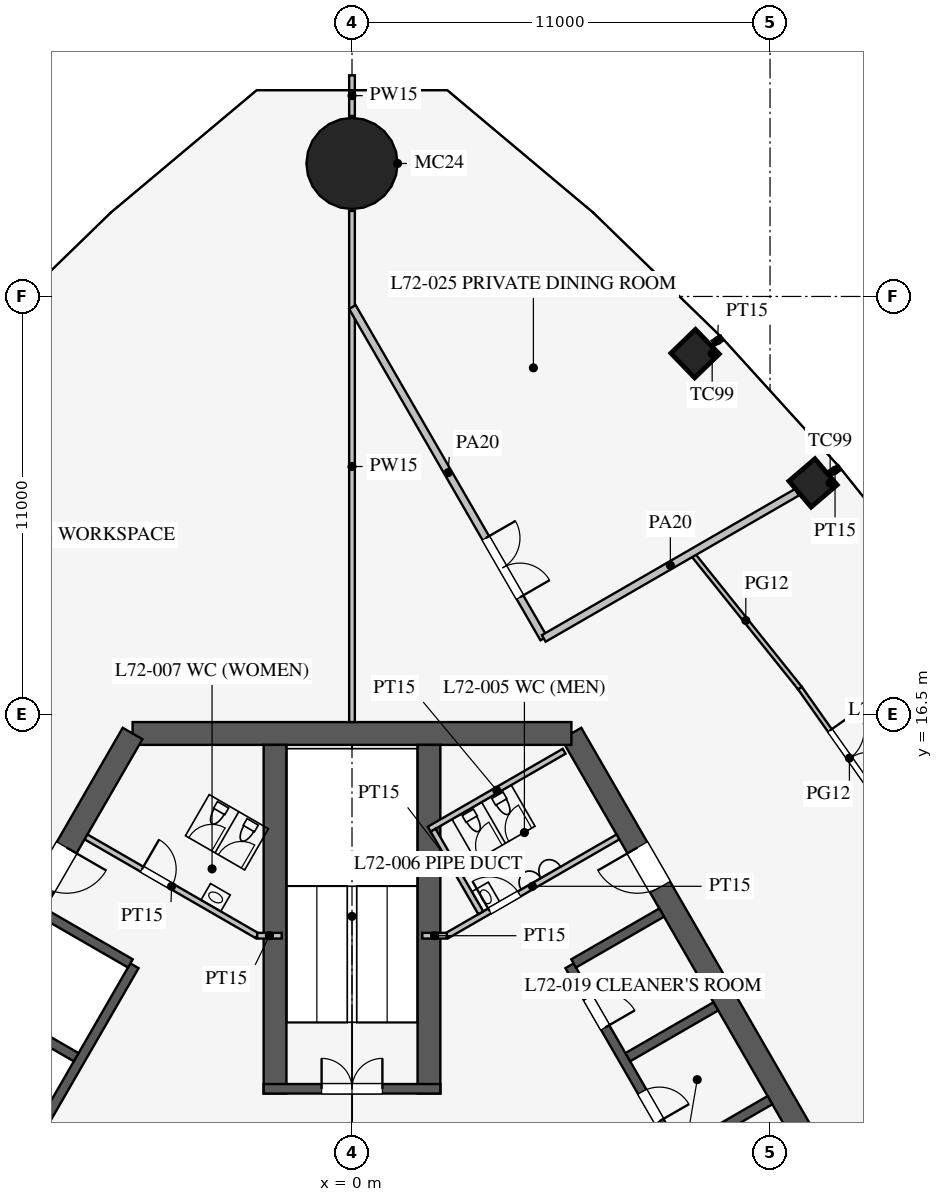
"""IFC4 building model, lengths in metres.
Left out: names, types, materials, properties, quantities, classifications, styles, units other than length and angle.
Written with IfcOpenShell. Run it as: python <this file> out.ifc"""

import sys

from ifc_helpers import new_model, si_unit, direction, frame, frame_2d, origin, origin_2d, place, context, subcontext, project, spatial, rectangle, circle, extrude, element, fill, save


model = new_model("IFC4")
c1 = context("Model", 3, precision=1e-05, world=origin(), true_north=direction((0.0, 1.0)))
c2 = subcontext(c1, "Body", "Model", "MODEL_VIEW")
j1 = project(units=[si_unit("LENGTHUNIT", "METRE"), si_unit("PLANEANGLEUNIT", "RADIAN")], contexts=[c1])
p1 = place(None, origin())
s1 = spatial("IfcSite", under=j1, at=p1, CompositionType="ELEMENT")
p2 = place(p1, origin())
s2 = spatial("IfcBuilding", under=s1, at=p2, CompositionType="ELEMENT")
p3 = place(p2, frame((0.0, 0.0, 314.1)))
s3 = spatial("IfcBuildingStorey", under=s2, at=p3, CompositionType="ELEMENT", Elevation=314.1)
for number, where, z_axis, x_axis in (
    (1, (12.132, 22.593, 0.0), (0.0, 0.0, 1.0), (-0.649, 0.761, 0.0)),
    (2, (9.027, 25.997, 0.0), (0.0, 0.0, 1.0), (-0.695, 0.719, 0.0)),
):
    element("IfcColumn", number, at=place(p3, frame(where, z_axis=z_axis, x_axis=x_axis)), inside=s3, PredefinedType="COLUMN", context=c2, shape_type="SweptSolid", body=[
        extrude(rectangle(XDim=0.9, YDim=0.9, at=origin_2d()), origin(), (0.0, 0.0, 1.0), 4.2),
    ])
p4 = place(p3, frame((0.0, 31.0, 0.0), z_axis=(0.0, 0.0, 1.0), x_axis=(1.0, 0.0, 0.0)))
e3 = element("IfcColumn", 3, at=p4, inside=s3, PredefinedType="COLUMN", context=c2, shape_type="SweptSolid", body=[
    extrude(circle(Radius=1.2, at=origin_2d()), origin(), (0.0, 0.0, 1.0), 4.2),
])
p5 = place(p3, frame((16.743, -3.0, 0.0), z_axis=(0.0, 0.0, 1.0), x_axis=(-0.500002442456, 0.866023993627, 0.0)))
e4 = element("IfcWall", 4, at=p5, inside=s3, PredefinedType="SHEAR", context=c2, shape_type="SweptSolid", body=[
    extrude(rectangle(XDim=21.939, YDim=0.6, at=frame_2d((10.97, 0.0))), origin(), (0.0, 0.0, 1.0), 4.2),
])
p6 = place(p5, frame((17.27, 0.0, 0.0)))
e5 = element("IfcOpeningElement", 5, at=p6, cuts=e4, PredefinedType="OPENING", context=c2, shape_type="SweptSolid", body=[
    extrude(rectangle(XDim=1.2, YDim=2.1, at=frame_2d((0.6, 1.05))), frame((0.0, 0.31, 0.0), z_axis=(0.0, -1.0, 0.0), x_axis=(1.0, 0.0, 0.0)), (0.0, 0.0, 1.0), 0.62),
])
p7 = place(p5, frame((3.47, 0.0, 0.0)))
e6 = element("IfcOpeningElement", 6, at=p7, cuts=e4, PredefinedType="OPENING", context=c2, shape_type="SweptSolid", body=[
    extrude(rectangle(XDim=1.2, YDim=2.1, at=frame_2d((0.6, 1.05))), frame((0.0, 0.31, 0.0), z_axis=(0.0, -1.0, 0.0), x_axis=(1.0, 0.0, 0.0)), (0.0, 0.0, 1.0), 0.62),
])
p8 = place(p3, frame((5.773, 16.0, 0.0), z_axis=(0.0, 0.0, 1.0), x_axis=(-1.0, 0.0, 0.0)))
e7 = element("IfcWall", 7, at=p8, inside=s3, PredefinedType="SHEAR", context=c2, shape_type="SweptSolid", body=[
    extrude(rectangle(XDim=11.547, YDim=0.6, at=frame_2d((5.773, 0.0))), origin(), (0.0, 0.0, 1.0), 4.2),
])
p9 = place(p3, frame((-5.773, 16.0, 0.0), z_axis=(0.0, 0.0, 1.0), x_axis=(-0.500002442456, -0.866023993627, 0.0)))
e8 = element("IfcWall", 8, at=p9, inside=s3, PredefinedType="SHEAR", context=c2, shape_type="SweptSolid", body=[
    extrude(rectangle(XDim=21.939, YDim=0.6, at=frame_2d((10.97, 0.0))), origin(), (0.0, 0.0, 1.0), 4.2),
])
p10 = place(p9, frame((17.27, 0.0, 0.0)))
e9 = element("IfcOpeningElement", 9, at=p10, cuts=e8, PredefinedType="OPENING", context=c2, shape_type="SweptSolid", body=[
    extrude(rectangle(XDim=1.2, YDim=2.1, at=frame_2d((0.6, 1.05))), frame((0.0, 0.31, 0.0), z_axis=(0.0, -1.0, 0.0), x_axis=(1.0, 0.0, 0.0)), (0.0, 0.0, 1.0), 0.62),
])
p11 = place(p9, frame((3.47, 0.0, 0.0)))
e10 = element("IfcOpeningElement", 10, at=p11, cuts=e8, PredefinedType="OPENING", context=c2, shape_type="SweptSolid", body=[
    extrude(rectangle(XDim=1.2, YDim=2.1, at=frame_2d((0.6, 1.05))), frame((0.0, 0.31, 0.0), z_axis=(0.0, -1.0, 0.0), x_axis=(1.0, 0.0, 0.0)), (0.0, 0.0, 1.0), 0.62),
])
p12 = place(p3, frame((11.424, 0.014, 0.0), z_axis=(0.0, 0.0, 1.0), x_axis=(-0.500001763848, 0.866024385424, 0.0)))
e11 = element("IfcWall", 11, at=p12, inside=s3, PredefinedType="SHEAR", context=c2, shape_type="SweptSolid", body=[
    extrude(rectangle(XDim=11.4, YDim=0.25, at=frame_2d((5.7, 0.0))), origin(), (0.0, 0.0, 1.0), 4.2),
])
p13 = place(p12, frame((0.975, 0.0, 0.0)))
e12 = element("IfcOpeningElement", 12, at=p13, cuts=e11, PredefinedType="OPENING", context=c2, shape_type="SweptSolid", body=[
    extrude(rectangle(XDim=0.9, YDim=2.1, at=frame_2d((0.45, 1.05))), frame((0.0, 0.135, 0.0), z_axis=(0.0, -1.0, 0.0), x_axis=(1.0, 0.0, 0.0)), (0.0, 0.0, 1.0), 0.27),
])
p14 = place(p12, frame((3.825, 0.0, 0.0)))
e13 = element("IfcOpeningElement", 13, at=p14, cuts=e11, PredefinedType="OPENING", context=c2, shape_type="SweptSolid", body=[
    extrude(rectangle(XDim=0.9, YDim=2.1, at=frame_2d((0.45, 1.05))), frame((0.0, 0.135, 0.0), z_axis=(0.0, -1.0, 0.0), x_axis=(1.0, 0.0, 0.0)), (0.0, 0.0, 1.0), 0.27),
])
p15 = place(p12, frame((6.675, 0.0, 0.0)))
e14 = element("IfcOpeningElement", 14, at=p15, cuts=e11, PredefinedType="OPENING", context=c2, shape_type="SweptSolid", body=[
    extrude(rectangle(XDim=0.9, YDim=2.1, at=frame_2d((0.45, 1.05))), frame((0.0, 0.135, 0.0), z_axis=(0.0, -1.0, 0.0), x_axis=(1.0, 0.0, 0.0)), (0.0, 0.0, 1.0), 0.27),
])
p16 = place(p12, frame((9.525, 0.0, 0.0)))
e15 = element("IfcOpeningElement", 15, at=p16, cuts=e11, PredefinedType="OPENING", context=c2, shape_type="SweptSolid", body=[
    extrude(rectangle(XDim=0.9, YDim=2.1, at=frame_2d((0.45, 1.05))), frame((0.0, 0.135, 0.0), z_axis=(0.0, -1.0, 0.0), x_axis=(1.0, 0.0, 0.0)), (0.0, 0.0, 1.0), 0.27),
])
for number, where, z_axis, x_axis in (
    (16, (8.682, 5.012, 0.0), (0.0, 0.0, 1.0), (0.866, 0.5, 0.0)),
    (17, (7.257, 7.481, 0.0), (0.0, 0.0, 1.0), (0.866, 0.5, 0.0)),
    (18, (5.832, 9.949, 0.0), (0.0, 0.0, 1.0), (0.866, 0.5, 0.0)),
):
    element("IfcWall", number, at=place(p3, frame(where, z_axis=z_axis, x_axis=x_axis)), inside=s3, PredefinedType="SHEAR", context=c2, shape_type="SweptSolid", body=[
        extrude(rectangle(XDim=2.675, YDim=0.25, at=frame_2d((1.337, 0.0))), origin(), (0.0, 0.0, 1.0), 4.2),
    ])
p17 = place(p3, frame((-5.724, 9.886, 0.0), z_axis=(0.0, 0.0, 1.0), x_axis=(-0.500001763848, -0.866024385424, 0.0)))
e19 = element("IfcWall", 19, at=p17, inside=s3, PredefinedType="SHEAR", context=c2, shape_type="SweptSolid", body=[
    extrude(rectangle(XDim=11.4, YDim=0.25, at=frame_2d((5.7, 0.0))), origin(), (0.0, 0.0, 1.0), 4.2),
])
p18 = place(p17, frame((6.525, 0.0, 0.0)))
e20 = element("IfcOpeningElement", 20, at=p18, cuts=e19, PredefinedType="OPENING", context=c2, shape_type="SweptSolid", body=[
    extrude(rectangle(XDim=1.2, YDim=2.2, at=frame_2d((0.6, 1.1))), frame((0.0, 0.135, 0.0), z_axis=(0.0, -1.0, 0.0), x_axis=(1.0, 0.0, 0.0)), (0.0, 0.0, 1.0), 0.27),
])
p19 = place(p17, frame((9.375, 0.0, 0.0)))
e21 = element("IfcOpeningElement", 21, at=p19, cuts=e19, PredefinedType="OPENING", context=c2, shape_type="SweptSolid", body=[
    extrude(rectangle(XDim=1.2, YDim=2.2, at=frame_2d((0.6, 1.1))), frame((0.0, 0.135, 0.0), z_axis=(0.0, -1.0, 0.0), x_axis=(1.0, 0.0, 0.0)), (0.0, 0.0, 1.0), 0.27),
])
for number, where, z_axis, x_axis in (
    (22, (-5.832, 9.949, 0.0), (0.0, 0.0, 1.0), (-0.866, 0.5, 0.0)),
    (23, (-7.257, 7.481, 0.0), (0.0, 0.0, 1.0), (-0.866, 0.5, 0.0)),
):
    element("IfcWall", number, at=place(p3, frame(where, z_axis=z_axis, x_axis=x_axis)), inside=s3, PredefinedType="SHEAR", context=c2, shape_type="SweptSolid", body=[
        extrude(rectangle(XDim=2.675, YDim=0.25, at=frame_2d((1.337, 0.0))), origin(), (0.0, 0.0, 1.0), 4.2),
    ])
for number, where, z_axis, x_axis in (
    (24, (2.025, 6.525, 0.0), (0.0, 0.0, 1.0), (0.0, 1.0, 0.0)),
    (25, (-2.025, 6.525, 0.0), (0.0, 0.0, 1.0), (0.0, 1.0, 0.0)),
):
    element("IfcWall", number, at=place(p3, frame(where, z_axis=z_axis, x_axis=x_axis)), inside=s3, PredefinedType="SHEAR", context=c2, shape_type="SweptSolid", body=[
        extrude(rectangle(XDim=9.175, YDim=0.6, at=frame_2d((4.587, 0.0))), origin(), (0.0, 0.0, 1.0), 4.2),
    ])
p20 = place(p3, frame((2.325, 6.65, 0.0), z_axis=(0.0, 0.0, 1.0), x_axis=(-1.0, 0.0, 0.0)))
e26 = element("IfcWall", 26, at=p20, inside=s3, PredefinedType="SHEAR", context=c2, shape_type="SweptSolid", body=[
    extrude(rectangle(XDim=4.65, YDim=0.25, at=frame_2d((2.325, 0.0))), origin(), (0.0, 0.0, 1.0), 4.2),
])
p21 = place(p20, frame((1.525, 0.0, 0.0)))
e27 = element("IfcOpeningElement", 27, at=p21, cuts=e26, PredefinedType="OPENING", context=c2, shape_type="SweptSolid", body=[
    extrude(rectangle(XDim=1.6, YDim=2.1, at=frame_2d((0.8, 1.05))), frame((0.0, 0.135, 0.0), z_axis=(0.0, -1.0, 0.0), x_axis=(1.0, 0.0, 0.0)), (0.0, 0.0, 1.0), 0.27),
])
p22 = place(p3, frame((2.495, 10.678, 0.0), z_axis=(0.0, 0.0, 1.0), x_axis=(0.866021400173, 0.500006934395, 0.0)))
e28 = element("IfcWall", 28, at=p22, inside=s3, PredefinedType="PARTITIONING", context=c2, shape_type="SweptSolid", body=[
    extrude(rectangle(XDim=5.2, YDim=0.15, at=frame_2d((2.6, 0.0))), origin(), (0.0, 0.0, 1.0), 4.0),
])
p23 = place(p22, frame((1.3, 0.0, 0.0)))
e29 = element("IfcOpeningElement", 29, at=p23, cuts=e28, PredefinedType="OPENING", context=c2, shape_type="SweptSolid", body=[
    extrude(rectangle(XDim=0.9, YDim=2.1, at=frame_2d((0.45, 1.05))), frame((0.0, 0.085, 0.0), z_axis=(0.0, -1.0, 0.0), x_axis=(1.0, 0.0, 0.0)), (0.0, 0.0, 1.0), 0.17),
])
p24 = place(p3, frame((-2.495, 10.678, 0.0), z_axis=(0.0, 0.0, 1.0), x_axis=(-0.866021400173, 0.500006934395, 0.0)))
e30 = element("IfcWall", 30, at=p24, inside=s3, PredefinedType="PARTITIONING", context=c2, shape_type="SweptSolid", body=[
    extrude(rectangle(XDim=5.2, YDim=0.15, at=frame_2d((2.6, 0.0))), origin(), (0.0, 0.0, 1.0), 4.0),
])
p25 = place(p24, frame((2.6, 0.0, 0.0)))
e31 = element("IfcOpeningElement", 31, at=p25, cuts=e30, PredefinedType="OPENING", context=c2, shape_type="SweptSolid", body=[
    extrude(rectangle(XDim=0.9, YDim=2.1, at=frame_2d((0.45, 1.05))), frame((0.0, 0.085, 0.0), z_axis=(0.0, -1.0, 0.0), x_axis=(1.0, 0.0, 0.0)), (0.0, 0.0, 1.0), 0.17),
])
for number, where, z_axis, x_axis in (
    (32, (2.495, 10.678, 0.0), (0.0, 0.0, 1.0), (-1.0, 0.0, 0.0)),
    (33, (-2.495, 10.678, 0.0), (0.0, 0.0, 1.0), (1.0, 0.0, 0.0)),
):
    element("IfcWall", number, at=place(p3, frame(where, z_axis=z_axis, x_axis=x_axis)), inside=s3, PredefinedType="PARTITIONING", context=c2, shape_type="SweptSolid", body=[
        extrude(rectangle(XDim=0.645, YDim=0.15, at=frame_2d((0.323, 0.0))), origin(), (0.0, 0.0, 1.0), 4.0),
    ])
p26 = place(p3, frame((2.031, 13.482, 0.0), z_axis=(0.0, 0.0, 1.0), x_axis=(0.866050731258, 0.499956128963, 0.0)))
e34 = element("IfcWall", 34, at=p26, inside=s3, PredefinedType="PARTITIONING", context=c2, shape_type="SweptSolid", body=[
    extrude(rectangle(XDim=4.1, YDim=0.15, at=frame_2d((2.05, 0.0))), origin(), (0.0, 0.0, 1.0), 4.0),
])
p27 = place(p3, frame((3.389, 11.281, 0.0), z_axis=(0.0, 0.0, 1.0), x_axis=(-0.499989096993, 0.866031698547, 0.0)))
e35 = element("IfcWall", 35, at=p27, inside=s3, PredefinedType="PARTITIONING", context=c2, shape_type="SweptSolid", body=[
    extrude(rectangle(XDim=2.51, YDim=0.15, at=frame_2d((1.255, 0.0))), origin(), (0.0, 0.0, 1.0), 4.0),
])
p28 = place(p3, frame((0.0, 16.3, 0.0), z_axis=(0.0, 0.0, 1.0), x_axis=(0.0, 1.0, 0.0)))
e36 = element("IfcWall", 36, at=p28, inside=s3, PredefinedType="PARTITIONING", context=c2, shape_type="SweptSolid", body=[
    extrude(rectangle(XDim=13.45, YDim=0.15, at=frame_2d((6.725, 0.0))), origin(), (0.0, 0.0, 1.0), 2.5),
])
p29 = place(p3, frame((0.0, 32.25, 0.0), z_axis=(0.0, 0.0, 1.0), x_axis=(0.0, 1.0, 0.0)))
e37 = element("IfcWall", 37, at=p29, inside=s3, PredefinedType="PARTITIONING", context=c2, shape_type="SweptSolid", body=[
    extrude(rectangle(XDim=1.07, YDim=0.15, at=frame_2d((0.535, 0.0))), origin(), (0.0, 0.0, 1.0), 2.5),
])
p30 = place(p3, frame((5.045, 18.501, 0.0), z_axis=(0.0, 0.0, 1.0), x_axis=(-0.499990381663, 0.866030956863, 0.0)))
e38 = element("IfcWall", 38, at=p30, inside=s3, PredefinedType="PARTITIONING", context=c2, shape_type="SweptSolid", body=[
    extrude(rectangle(XDim=10.07, YDim=0.2, at=frame_2d((5.035, 0.0))), origin(), (0.0, 0.0, 1.0), 2.9),
])
p31 = place(p30, frame((1.25, 0.0, 0.15)))
e39 = element("IfcOpeningElement", 39, at=p31, cuts=e38, PredefinedType="OPENING", context=c2, shape_type="SweptSolid", body=[
    extrude(rectangle(XDim=1.8, YDim=2.1, at=frame_2d((0.9, 1.05))), frame((0.0, 0.11, 0.0), z_axis=(0.0, -1.0, 0.0), x_axis=(1.0, 0.0, 0.0)), (0.0, 0.0, 1.0), 0.22),
])
p32 = place(p3, frame((12.589, 22.857, 0.0), z_axis=(0.0, 0.0, 1.0), x_axis=(0.865982457891, 0.500074377092, 0.0)))
e40 = element("IfcWall", 40, at=p32, inside=s3, PredefinedType="PARTITIONING", context=c2, shape_type="SweptSolid", body=[
    extrude(rectangle(XDim=0.28, YDim=0.15, at=frame_2d((0.14, 0.0))), origin(), (0.0, 0.0, 1.0), 2.9),
])
p33 = place(p3, frame((9.504, 26.271, 0.0), z_axis=(0.0, 0.0, 1.0), x_axis=(0.866004557827, 0.500036104519, 0.0)))
e41 = element("IfcWall", 41, at=p33, inside=s3, PredefinedType="PARTITIONING", context=c2, shape_type="SweptSolid", body=[
    extrude(rectangle(XDim=0.27, YDim=0.15, at=frame_2d((0.135, 0.0))), origin(), (0.0, 0.0, 1.0), 2.9),
])
p34 = place(p3, frame((14.391, 13.505, 0.0), z_axis=(0.0, 0.0, 1.0), x_axis=(-0.576562277172, 0.817053205454, 0.0)))
e42 = element("IfcWall", 42, at=p34, inside=s3, PredefinedType="PARTITIONING", context=c2, shape_type="SweptSolid", body=[
    extrude(rectangle(XDim=4.519, YDim=0.12, at=frame_2d((2.259, 0.0))), origin(), (0.0, 0.0, 1.0), 2.9),
])
p35 = place(p34, frame((1.35, 0.0, 0.15)))
e43 = element("IfcOpeningElement", 43, at=p35, cuts=e42, PredefinedType="OPENING", context=c2, shape_type="SweptSolid", body=[
    extrude(rectangle(XDim=1.8, YDim=2.1, at=frame_2d((0.9, 1.05))), frame((0.0, 0.07, 0.0), z_axis=(0.0, -1.0, 0.0), x_axis=(1.0, 0.0, 0.0)), (0.0, 0.0, 1.0), 0.14),
])
p36 = place(p3, frame((11.786, 17.197, 0.0), z_axis=(0.0, 0.0, 1.0), x_axis=(-0.625263875383, 0.780413407202, 0.0)))
e44 = element("IfcWall", 44, at=p36, inside=s3, PredefinedType="PARTITIONING", context=c2, shape_type="SweptSolid", body=[
    extrude(rectangle(XDim=4.552, YDim=0.12, at=frame_2d((2.276, 0.0))), origin(), (0.0, 0.0, 1.0), 2.9),
])
p37 = place(p3, frame((5.045, 18.501, 0.0), z_axis=(0.0, 0.0, 1.0), x_axis=(0.866043990756, 0.499967805039, 0.0)))
e45 = element("IfcWall", 45, at=p37, inside=s3, PredefinedType="PARTITIONING", context=c2, shape_type="SweptSolid", body=[
    extrude(rectangle(XDim=7.695, YDim=0.2, at=frame_2d((3.847, 0.0))), origin(), (0.0, 0.0, 1.0), 2.9),
])
p38 = place(p23, origin())
e46 = element("IfcDoor", 46, at=p38, inside=s3, OperationType="SINGLE_SWING_LEFT", PredefinedType="DOOR", context=c2, shape_type="SweptSolid", body=[
    extrude(rectangle(XDim=0.9, YDim=2.1, at=frame_2d((0.45, 1.05))), frame((0.0, 0.025, 0.0), z_axis=(0.0, -1.0, 0.0), x_axis=(1.0, 0.0, 0.0)), (0.0, 0.0, 1.0), 0.05),
])
fill(e29, e46)
p39 = place(p25, frame((0.9, 0.0, 0.0), z_axis=(0.0, 0.0, 1.0), x_axis=(-1.0, 0.0, 0.0)))
e47 = element("IfcDoor", 47, at=p39, inside=s3, OperationType="SINGLE_SWING_LEFT", PredefinedType="DOOR", context=c2, shape_type="SweptSolid", body=[
    extrude(rectangle(XDim=0.9, YDim=2.1, at=frame_2d((0.45, 1.05))), frame((0.0, 0.025, 0.0), z_axis=(0.0, -1.0, 0.0), x_axis=(1.0, 0.0, 0.0)), (0.0, 0.0, 1.0), 0.05),
])
fill(e31, e47)
p40 = place(p21, frame((1.6, 0.0, 0.0), z_axis=(0.0, 0.0, 1.0), x_axis=(-1.0, 0.0, 0.0)))
e48 = element("IfcDoor", 48, at=p40, inside=s3, OperationType="DOUBLE_DOOR_SINGLE_SWING", PredefinedType="DOOR", context=c2, shape_type="SweptSolid", body=[
    extrude(rectangle(XDim=1.6, YDim=2.1, at=frame_2d((0.8, 1.05))), frame((0.0, 0.025, 0.0), z_axis=(0.0, -1.0, 0.0), x_axis=(1.0, 0.0, 0.0)), (0.0, 0.0, 1.0), 0.05),
])
fill(e27, e48)
p41 = place(p6, origin())
e49 = element("IfcDoor", 49, at=p41, inside=s3, OperationType="SINGLE_SWING_RIGHT", PredefinedType="DOOR", context=c2, shape_type="SweptSolid", body=[
    extrude(rectangle(XDim=1.2, YDim=2.1, at=frame_2d((0.6, 1.05))), frame((0.0, 0.025, 0.0), z_axis=(0.0, -1.0, 0.0), x_axis=(1.0, 0.0, 0.0)), (0.0, 0.0, 1.0), 0.05),
])
fill(e5, e49)
p42 = place(p11, origin())
e50 = element("IfcDoor", 50, at=p42, inside=s3, OperationType="SINGLE_SWING_LEFT", PredefinedType="DOOR", context=c2, shape_type="SweptSolid", body=[
    extrude(rectangle(XDim=1.2, YDim=2.1, at=frame_2d((0.6, 1.05))), frame((0.0, 0.025, 0.0), z_axis=(0.0, -1.0, 0.0), x_axis=(1.0, 0.0, 0.0)), (0.0, 0.0, 1.0), 0.05),
])
fill(e10, e50)
p43 = place(p15, frame((0.9, 0.0, 0.0), z_axis=(0.0, 0.0, 1.0), x_axis=(-1.0, 0.0, 0.0)))
e51 = element("IfcDoor", 51, at=p43, inside=s3, OperationType="SINGLE_SWING_RIGHT", PredefinedType="DOOR", context=c2, shape_type="SweptSolid", body=[
    extrude(rectangle(XDim=0.9, YDim=2.1, at=frame_2d((0.45, 1.05))), frame((0.0, 0.025, 0.0), z_axis=(0.0, -1.0, 0.0), x_axis=(1.0, 0.0, 0.0)), (0.0, 0.0, 1.0), 0.05),
])
fill(e14, e51)
p44 = place(p16, frame((0.9, 0.0, 0.0), z_axis=(0.0, 0.0, 1.0), x_axis=(-1.0, 0.0, 0.0)))
e52 = element("IfcDoor", 52, at=p44, inside=s3, OperationType="SINGLE_SWING_RIGHT", PredefinedType="DOOR", context=c2, shape_type="SweptSolid", body=[
    extrude(rectangle(XDim=0.9, YDim=2.1, at=frame_2d((0.45, 1.05))), frame((0.0, 0.025, 0.0), z_axis=(0.0, -1.0, 0.0), x_axis=(1.0, 0.0, 0.0)), (0.0, 0.0, 1.0), 0.05),
])
fill(e15, e52)
p45 = place(p31, frame((1.8, 0.0, 0.0), z_axis=(0.0, 0.0, 1.0), x_axis=(-1.0, 0.0, 0.0)))
e53 = element("IfcDoor", 53, at=p45, inside=s3, OperationType="DOUBLE_DOOR_SINGLE_SWING", PredefinedType="DOOR", context=c2, shape_type="SweptSolid", body=[
    extrude(rectangle(XDim=1.8, YDim=2.1, at=frame_2d((0.9, 1.05))), frame((0.0, 0.025, 0.0), z_axis=(0.0, -1.0, 0.0), x_axis=(1.0, 0.0, 0.0)), (0.0, 0.0, 1.0), 0.05),
])
fill(e39, e53)
p46 = place(p35, frame((1.8, 0.0, 0.0), z_axis=(0.0, 0.0, 1.0), x_axis=(-1.0, 0.0, 0.0)))
e54 = element("IfcDoor", 54, at=p46, inside=s3, OperationType="DOUBLE_DOOR_SINGLE_SWING", PredefinedType="DOOR", context=c2, shape_type="SweptSolid", body=[
    extrude(rectangle(XDim=1.8, YDim=2.1, at=frame_2d((0.9, 1.05))), frame((0.0, 0.025, 0.0), z_axis=(0.0, -1.0, 0.0), x_axis=(1.0, 0.0, 0.0)), (0.0, 0.0, 1.0), 0.05),
])
fill(e43, e54)
save(model, sys.argv[1])
